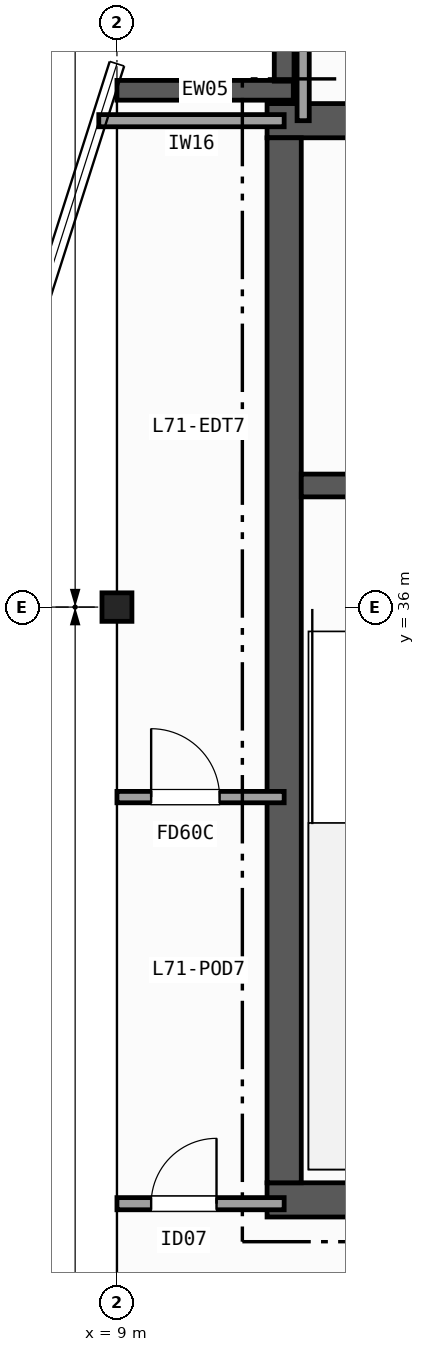
"""IFC4 building model, lengths in metres.
Left out: names, types, materials, properties, quantities, classifications, styles, units other than length and angle.
Written with IfcOpenShell. Run it as: python <this file> out.ifc"""

import sys

from ifc_helpers import new_model, si_unit, direction, frame, frame_2d, origin, origin_2d, place, context, subcontext, project, spatial, rectangle, i_section, extrude, element, fill, save


model = new_model("IFC4")
c1 = context("Model", 3, precision=1e-05, world=origin(), true_north=direction((0.0, 1.0)))
c2 = subcontext(c1, "Body", "Model", "MODEL_VIEW")
j1 = project(units=[si_unit("LENGTHUNIT", "METRE"), si_unit("PLANEANGLEUNIT", "RADIAN")], contexts=[c1])
p1 = place(None, origin())
s1 = spatial("IfcSite", under=j1, at=p1, CompositionType="ELEMENT")
p2 = place(p1, origin())
s2 = spatial("IfcBuilding", under=s1, at=p2, CompositionType="ELEMENT")
p3 = place(p2, frame((0.0, 0.0, 281.5)))
s3 = spatial("IfcBuildingStorey", under=s2, at=p3, CompositionType="ELEMENT", Elevation=281.5)
p4 = place(p3, frame((9.0, 36.0, 0.0), z_axis=(0.0, 0.0, 1.0), x_axis=(1.0, 0.0, 0.0)))
e1 = element("IfcColumn", 1, at=p4, inside=s3, PredefinedType="COLUMN", context=c2, shape_type="SweptSolid", body=[
    extrude(i_section(OverallWidth=0.394, OverallDepth=0.375, WebThickness=0.017, FlangeThickness=0.028, FilletRadius=0.015, at=origin_2d()), origin(), (0.0, 0.0, 1.0), 3.7),
])
p5 = place(p3, frame((9.0, 42.8, 0.0), z_axis=(0.0, 0.0, 1.0), x_axis=(1.0, 0.0, 0.0)))
e2 = element("IfcWall", 2, at=p5, inside=s3, PredefinedType="SOLIDWALL", context=c2, shape_type="SweptSolid", body=[
    extrude(rectangle(XDim=2.32, YDim=0.26, at=frame_2d((1.16, 0.0))), origin(), (0.0, 0.0, 1.0), 3.37),
])
p6 = place(p3, frame((11.2, 42.92, 0.0), z_axis=(0.0, 0.0, 1.0), x_axis=(0.0, 1.0, 0.0)))
e3 = element("IfcWall", 3, at=p6, inside=s3, PredefinedType="SOLIDWALL", context=c2, shape_type="SweptSolid", body=[
    extrude(rectangle(XDim=2.08, YDim=0.26, at=frame_2d((1.04, 0.0))), origin(), (0.0, 0.0, 1.0), 3.37),
])
p7 = place(p3, frame((10.975, 28.2, 0.0), z_axis=(0.0, 0.0, 1.0), x_axis=(1.0, 0.0, 0.0)))
e4 = element("IfcWall", 4, at=p7, inside=s3, PredefinedType="SHEAR", context=c2, shape_type="SweptSolid", body=[
    extrude(rectangle(XDim=13.85, YDim=0.45, at=frame_2d((6.925, 0.0))), origin(), (0.0, 0.0, 1.0), 3.37),
])
p8 = place(p3, frame((24.825, 42.4, 0.0), z_axis=(0.0, 0.0, 1.0), x_axis=(-1.0, 0.0, 0.0)))
e5 = element("IfcWall", 5, at=p8, inside=s3, PredefinedType="SHEAR", context=c2, shape_type="SweptSolid", body=[
    extrude(rectangle(XDim=13.85, YDim=0.45, at=frame_2d((6.925, 0.0))), origin(), (0.0, 0.0, 1.0), 3.37),
])
p9 = place(p8, frame((10.025, 0.0, 0.0)))
e6 = element("IfcOpeningElement", 6, at=p9, cuts=e5, PredefinedType="OPENING", context=c2, shape_type="SweptSolid", body=[
    extrude(rectangle(XDim=1.2, YDim=2.15, at=frame_2d((0.6, 1.075))), frame((0.0, 0.235, 0.0), z_axis=(0.0, -1.0, 0.0), x_axis=(1.0, 0.0, 0.0)), (0.0, 0.0, 1.0), 0.47),
])
p10 = place(p8, frame((2.975, 0.0, 0.0)))
e7 = element("IfcOpeningElement", 7, at=p10, cuts=e5, PredefinedType="OPENING", context=c2, shape_type="SweptSolid", body=[
    extrude(rectangle(XDim=0.9, YDim=2.1, at=frame_2d((0.45, 1.05))), frame((0.0, 0.235, 0.0), z_axis=(0.0, -1.0, 0.0), x_axis=(1.0, 0.0, 0.0)), (0.0, 0.0, 1.0), 0.47),
])
p11 = place(p3, frame((11.2, 42.175, 0.0), z_axis=(0.0, 0.0, 1.0), x_axis=(0.0, -1.0, 0.0)))
e8 = element("IfcWall", 8, at=p11, inside=s3, PredefinedType="SHEAR", context=c2, shape_type="SweptSolid", body=[
    extrude(rectangle(XDim=13.75, YDim=0.45, at=frame_2d((6.875, 0.0))), origin(), (0.0, 0.0, 1.0), 3.37),
])
p12 = place(p3, frame((17.77, 37.6, 0.0), z_axis=(0.0, 0.0, 1.0), x_axis=(-1.0, 0.0, 0.0)))
e9 = element("IfcWall", 9, at=p12, inside=s3, PredefinedType="SHEAR", context=c2, shape_type="SweptSolid", body=[
    extrude(rectangle(XDim=6.345, YDim=0.3, at=frame_2d((3.172, 0.0))), origin(), (0.0, 0.0, 1.0), 3.37),
])
p13 = place(p12, frame((4.22, 0.0, 0.0)))
e10 = element("IfcOpeningElement", 10, at=p13, cuts=e9, PredefinedType="OPENING", context=c2, shape_type="SweptSolid", body=[
    extrude(rectangle(XDim=1.2, YDim=2.15, at=frame_2d((0.6, 1.075))), frame((0.0, 0.16, 0.0), z_axis=(0.0, -1.0, 0.0), x_axis=(1.0, 0.0, 0.0)), (0.0, 0.0, 1.0), 0.32),
])
p14 = place(p12, frame((1.12, 0.0, 0.0)))
e11 = element("IfcOpeningElement", 11, at=p14, cuts=e9, PredefinedType="OPENING", context=c2, shape_type="SweptSolid", body=[
    extrude(rectangle(XDim=1.2, YDim=2.15, at=frame_2d((0.6, 1.075))), frame((0.0, 0.16, 0.0), z_axis=(0.0, -1.0, 0.0), x_axis=(1.0, 0.0, 0.0)), (0.0, 0.0, 1.0), 0.32),
])
p15 = place(p3, frame((9.0, 28.15, 0.0), z_axis=(0.0, 0.0, 1.0), x_axis=(1.0, 0.0, 0.0)))
e12 = element("IfcWall", 12, at=p15, inside=s3, PredefinedType="PARTITIONING", context=c2, shape_type="SweptSolid", body=[
    extrude(rectangle(XDim=2.2, YDim=0.16, at=frame_2d((1.1, 0.0))), origin(), (0.0, 0.0, 1.0), 2.657),
])
p16 = place(p15, frame((0.45, 0.0, 0.0)))
e13 = element("IfcOpeningElement", 13, at=p16, cuts=e12, PredefinedType="OPENING", context=c2, shape_type="SweptSolid", body=[
    extrude(rectangle(XDim=0.86, YDim=2.05, at=frame_2d((0.43, 1.025))), frame((0.0, 0.09, 0.0), z_axis=(0.0, -1.0, 0.0), x_axis=(1.0, 0.0, 0.0)), (0.0, 0.0, 1.0), 0.18),
])
p17 = place(p3, frame((8.761, 42.4, 0.0), z_axis=(0.0, 0.0, 1.0), x_axis=(1.0, 0.0, 0.0)))
e14 = element("IfcWall", 14, at=p17, inside=s3, PredefinedType="PARTITIONING", context=c2, shape_type="SweptSolid", body=[
    extrude(rectangle(XDim=2.439, YDim=0.16, at=frame_2d((1.219, 0.0))), origin(), (0.0, 0.0, 1.0), 3.37),
])
p18 = place(p3, frame((11.45, 42.4, 0.0), z_axis=(0.0, 0.0, 1.0), x_axis=(0.0, 1.0, 0.0)))
e15 = element("IfcWall", 15, at=p18, inside=s3, PredefinedType="PARTITIONING", context=c2, shape_type="SweptSolid", body=[
    extrude(rectangle(XDim=2.666, YDim=0.16, at=frame_2d((1.333, 0.0))), origin(), (0.0, 0.0, 1.0), 3.37),
])
p19 = place(p3, frame((9.0, 33.5, 0.0), z_axis=(0.0, 0.0, 1.0), x_axis=(1.0, 0.0, 0.0)))
e16 = element("IfcWall", 16, at=p19, inside=s3, PredefinedType="PARTITIONING", context=c2, shape_type="SweptSolid", body=[
    extrude(rectangle(XDim=2.2, YDim=0.15, at=frame_2d((1.1, 0.0))), origin(), (0.0, 0.0, 1.0), 2.657),
])
p20 = place(p19, frame((0.45, 0.0, 0.0)))
e17 = element("IfcOpeningElement", 17, at=p20, cuts=e16, PredefinedType="OPENING", context=c2, shape_type="SweptSolid", body=[
    extrude(rectangle(XDim=0.9, YDim=2.1, at=frame_2d((0.45, 1.05))), frame((0.0, 0.085, 0.0), z_axis=(0.0, -1.0, 0.0), x_axis=(1.0, 0.0, 0.0)), (0.0, 0.0, 1.0), 0.17),
])
p21 = place(p16, origin())
e18 = element("IfcDoor", 18, at=p21, inside=s3, OperationType="SINGLE_SWING_RIGHT", PredefinedType="DOOR", context=c2, shape_type="SweptSolid", body=[
    extrude(rectangle(XDim=0.86, YDim=2.05, at=frame_2d((0.43, 1.025))), frame((0.0, 0.025, 0.0), z_axis=(0.0, -1.0, 0.0), x_axis=(1.0, 0.0, 0.0)), (0.0, 0.0, 1.0), 0.05),
])
fill(e13, e18)
p22 = place(p20, origin())
e19 = element("IfcDoor", 19, at=p22, inside=s3, OperationType="SINGLE_SWING_LEFT", PredefinedType="DOOR", context=c2, shape_type="SweptSolid", body=[
    extrude(rectangle(XDim=0.9, YDim=2.1, at=frame_2d((0.45, 1.05))), frame((0.0, 0.025, 0.0), z_axis=(0.0, -1.0, 0.0), x_axis=(1.0, 0.0, 0.0)), (0.0, 0.0, 1.0), 0.05),
])
fill(e17, e19)
save(model, sys.argv[1])
